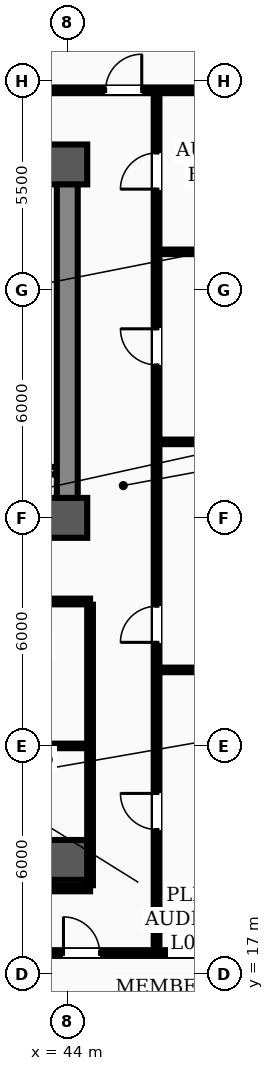
"""IFC4 building model, lengths in metres.
Left out: names, types, materials, properties, quantities, classifications, styles, units other than length and angle.
Written with IfcOpenShell. Run it as: python <this file> out.ifc"""

import sys

from ifc_helpers import new_model, si_unit, direction, frame, frame_2d, origin, origin_2d, place, context, subcontext, project, spatial, rectangle, hollow_rectangle, extrude, element, fill, save


model = new_model("IFC4")
c1 = context("Model", 3, precision=1e-05, world=origin(), true_north=direction((0.0, 1.0)))
c2 = subcontext(c1, "Body", "Model", "MODEL_VIEW")
j1 = project(units=[si_unit("LENGTHUNIT", "METRE"), si_unit("PLANEANGLEUNIT", "RADIAN")], contexts=[c1])
p1 = place(None, origin())
s1 = spatial("IfcSite", under=j1, at=p1, CompositionType="ELEMENT")
p2 = place(p1, origin())
s2 = spatial("IfcBuilding", under=s1, at=p2, CompositionType="ELEMENT")
p3 = place(p2, frame((0.0, 0.0, 22.0)))
s3 = spatial("IfcBuildingStorey", under=s2, at=p3, CompositionType="ELEMENT", Elevation=22.0)
for number, where, z_axis, x_axis in (
    (1, (44.0, 29.0, 0.0), (0.0, 0.0, 1.0), (1.0, 0.0, 0.0)),
    (2, (44.0, 38.3, 0.0), (0.0, 0.0, 1.0), (1.0, 0.0, 0.0)),
    (3, (44.0, 20.0, 0.0), (0.0, 0.0, 1.0), (1.0, 0.0, 0.0)),
):
    element("IfcColumn", number, at=place(p3, frame(where, z_axis=z_axis, x_axis=x_axis)), inside=s3, PredefinedType="COLUMN", context=c2, shape_type="SweptSolid", body=[
        extrude(hollow_rectangle(XDim=1.05, YDim=1.05, WallThickness=0.038, InnerFilletRadius=0.019, OuterFilletRadius=0.057, at=origin_2d()), origin(), (0.0, 0.0, 1.0), 4.5),
    ])
p4 = place(p3, frame((13.5, 29.0, 0.0), z_axis=(0.0, 0.0, 1.0), x_axis=(1.0, 0.0, 0.0)))
e4 = element("IfcWall", 4, at=p4, inside=s3, PredefinedType="SHEAR", context=c2, shape_type="SweptSolid", body=[
    extrude(rectangle(XDim=30.5, YDim=0.55, at=frame_2d((15.25, 0.0))), origin(), (0.0, 0.0, 1.0), 4.32),
])
p5 = place(p4, frame((1.75, 0.0, 0.0)))
e5 = element("IfcOpeningElement", 5, at=p5, cuts=e4, PredefinedType="OPENING", context=c2, shape_type="SweptSolid", body=[
    extrude(rectangle(XDim=1.1, YDim=2.08, at=frame_2d((0.55, 1.04))), frame((0.0, 0.285, 0.0), z_axis=(0.0, -1.0, 0.0), x_axis=(1.0, 0.0, 0.0)), (0.0, 0.0, 1.0), 0.57),
])
p6 = place(p4, frame((26.7, 0.0, 0.0)))
e6 = element("IfcOpeningElement", 6, at=p6, cuts=e4, PredefinedType="OPENING", context=c2, shape_type="SweptSolid", body=[
    extrude(rectangle(XDim=1.1, YDim=2.08, at=frame_2d((0.55, 1.04))), frame((0.0, 0.285, 0.0), z_axis=(0.0, -1.0, 0.0), x_axis=(1.0, 0.0, 0.0)), (0.0, 0.0, 1.0), 0.57),
])
p7 = place(p4, frame((6.8, 0.0, 0.0)))
e7 = element("IfcOpeningElement", 7, at=p7, cuts=e4, PredefinedType="OPENING", context=c2, shape_type="SweptSolid", body=[
    extrude(rectangle(XDim=1.1, YDim=2.08, at=frame_2d((0.55, 1.04))), frame((0.0, 0.285, 0.0), z_axis=(0.0, -1.0, 0.0), x_axis=(1.0, 0.0, 0.0)), (0.0, 0.0, 1.0), 0.57),
])
p8 = place(p4, frame((13.2, 0.0, 0.0)))
e8 = element("IfcOpeningElement", 8, at=p8, cuts=e4, PredefinedType="OPENING", context=c2, shape_type="SweptSolid", body=[
    extrude(rectangle(XDim=1.6, YDim=2.08, at=frame_2d((0.8, 1.04))), frame((0.0, 0.285, 0.0), z_axis=(0.0, -1.0, 0.0), x_axis=(1.0, 0.0, 0.0)), (0.0, 0.0, 1.0), 0.57),
])
p9 = place(p4, frame((19.5, 0.0, 0.0)))
e9 = element("IfcOpeningElement", 9, at=p9, cuts=e4, PredefinedType="OPENING", context=c2, shape_type="SweptSolid", body=[
    extrude(rectangle(XDim=0.9, YDim=2.08, at=frame_2d((0.45, 1.04))), frame((0.0, 0.285, 0.0), z_axis=(0.0, -1.0, 0.0), x_axis=(1.0, 0.0, 0.0)), (0.0, 0.0, 1.0), 0.57),
])
p10 = place(p4, frame((21.55, 0.0, 0.0)))
e10 = element("IfcOpeningElement", 10, at=p10, cuts=e4, PredefinedType="OPENING", context=c2, shape_type="SweptSolid", body=[
    extrude(rectangle(XDim=0.9, YDim=2.08, at=frame_2d((0.45, 1.04))), frame((0.0, 0.285, 0.0), z_axis=(0.0, -1.0, 0.0), x_axis=(1.0, 0.0, 0.0)), (0.0, 0.0, 1.0), 0.57),
])
p11 = place(p3, frame((13.5, 38.3, 0.0), z_axis=(0.0, 0.0, 1.0), x_axis=(1.0, 0.0, 0.0)))
e11 = element("IfcWall", 11, at=p11, inside=s3, PredefinedType="SHEAR", context=c2, shape_type="SweptSolid", body=[
    extrude(rectangle(XDim=30.5, YDim=0.55, at=frame_2d((15.25, 0.0))), origin(), (0.0, 0.0, 1.0), 4.32),
])
p12 = place(p3, frame((44.0, 29.35, 0.0), z_axis=(0.0, 0.0, 1.0), x_axis=(0.0, 1.0, 0.0)))
e12 = element("IfcWall", 12, at=p12, inside=s3, PredefinedType="SHEAR", context=c2, shape_type="SweptSolid", body=[
    extrude(rectangle(XDim=8.6, YDim=0.55, at=frame_2d((4.3, 0.0))), origin(), (0.0, 0.0, 1.0), 4.32),
])
p13 = place(p3, frame((42.4, 30.24, 0.0), z_axis=(0.0, 0.0, 1.0), x_axis=(1.0, 0.0, 0.0)))
e13 = element("IfcWall", 13, at=p13, inside=s3, PredefinedType="STANDARD", context=c2, shape_type="SweptSolid", body=[
    extrude(rectangle(XDim=1.315, YDim=0.2, at=frame_2d((0.658, 0.0))), origin(), (0.0, 0.0, 1.0), 3.7),
])
p14 = place(p3, frame((12.9, 26.8, 0.0), z_axis=(0.0, 0.0, 1.0), x_axis=(1.0, 0.0, 0.0)))
e14 = element("IfcWall", 14, at=p14, inside=s3, PredefinedType="PARTITIONING", context=c2, shape_type="SweptSolid", body=[
    extrude(rectangle(XDim=31.7, YDim=0.15, at=frame_2d((15.85, 0.0))), origin(), (0.0, 0.0, 1.0), 3.7),
])
p15 = place(p14, frame((13.6, 0.0, 0.0)))
e15 = element("IfcOpeningElement", 15, at=p15, cuts=e14, PredefinedType="OPENING", context=c2, shape_type="SweptSolid", body=[
    extrude(rectangle(XDim=1.6, YDim=2.08, at=frame_2d((0.8, 1.04))), frame((0.0, 0.085, 0.0), z_axis=(0.0, -1.0, 0.0), x_axis=(1.0, 0.0, 0.0)), (0.0, 0.0, 1.0), 0.17),
])
p16 = place(p14, frame((1.775, 0.0, 0.0)))
e16 = element("IfcOpeningElement", 16, at=p16, cuts=e14, PredefinedType="OPENING", context=c2, shape_type="SweptSolid", body=[
    extrude(rectangle(XDim=0.95, YDim=2.08, at=frame_2d((0.475, 1.04))), frame((0.0, 0.085, 0.0), z_axis=(0.0, -1.0, 0.0), x_axis=(1.0, 0.0, 0.0)), (0.0, 0.0, 1.0), 0.17),
])
p17 = place(p14, frame((6.225, 0.0, 0.0)))
e17 = element("IfcOpeningElement", 17, at=p17, cuts=e14, PredefinedType="OPENING", context=c2, shape_type="SweptSolid", body=[
    extrude(rectangle(XDim=0.95, YDim=2.08, at=frame_2d((0.475, 1.04))), frame((0.0, 0.085, 0.0), z_axis=(0.0, -1.0, 0.0), x_axis=(1.0, 0.0, 0.0)), (0.0, 0.0, 1.0), 0.17),
])
p18 = place(p14, frame((10.625, 0.0, 0.0)))
e18 = element("IfcOpeningElement", 18, at=p18, cuts=e14, PredefinedType="OPENING", context=c2, shape_type="SweptSolid", body=[
    extrude(rectangle(XDim=0.95, YDim=2.08, at=frame_2d((0.475, 1.04))), frame((0.0, 0.085, 0.0), z_axis=(0.0, -1.0, 0.0), x_axis=(1.0, 0.0, 0.0)), (0.0, 0.0, 1.0), 0.17),
])
p19 = place(p14, frame((16.075, 0.0, 0.0)))
e19 = element("IfcOpeningElement", 19, at=p19, cuts=e14, PredefinedType="OPENING", context=c2, shape_type="SweptSolid", body=[
    extrude(rectangle(XDim=0.95, YDim=2.08, at=frame_2d((0.475, 1.04))), frame((0.0, 0.085, 0.0), z_axis=(0.0, -1.0, 0.0), x_axis=(1.0, 0.0, 0.0)), (0.0, 0.0, 1.0), 0.17),
])
p20 = place(p14, frame((21.925, 0.0, 0.0)))
e20 = element("IfcOpeningElement", 20, at=p20, cuts=e14, PredefinedType="OPENING", context=c2, shape_type="SweptSolid", body=[
    extrude(rectangle(XDim=0.95, YDim=2.08, at=frame_2d((0.475, 1.04))), frame((0.0, 0.085, 0.0), z_axis=(0.0, -1.0, 0.0), x_axis=(1.0, 0.0, 0.0)), (0.0, 0.0, 1.0), 0.17),
])
p21 = place(p14, frame((28.625, 0.0, 0.0)))
e21 = element("IfcOpeningElement", 21, at=p21, cuts=e14, PredefinedType="OPENING", context=c2, shape_type="SweptSolid", body=[
    extrude(rectangle(XDim=0.95, YDim=2.08, at=frame_2d((0.475, 1.04))), frame((0.0, 0.085, 0.0), z_axis=(0.0, -1.0, 0.0), x_axis=(1.0, 0.0, 0.0)), (0.0, 0.0, 1.0), 0.17),
])
p22 = place(p3, frame((4.66, 17.55, 0.0), z_axis=(0.0, 0.0, 1.0), x_axis=(1.0, 0.0, 0.0)))
e22 = element("IfcWall", 22, at=p22, inside=s3, PredefinedType="PARTITIONING", context=c2, shape_type="SweptSolid", body=[
    extrude(rectangle(XDim=44.68, YDim=0.15, at=frame_2d((22.34, 0.0))), origin(), (0.0, 0.0, 1.0), 3.7),
])
p23 = place(p22, frame((6.74, 0.0, 0.0)))
e23 = element("IfcOpeningElement", 23, at=p23, cuts=e22, PredefinedType="OPENING", context=c2, shape_type="SweptSolid", body=[
    extrude(rectangle(XDim=0.95, YDim=2.08, at=frame_2d((0.475, 1.04))), frame((0.0, 0.085, 0.0), z_axis=(0.0, -1.0, 0.0), x_axis=(1.0, 0.0, 0.0)), (0.0, 0.0, 1.0), 0.17),
])
p24 = place(p22, frame((13.865, 0.0, 0.0)))
e24 = element("IfcOpeningElement", 24, at=p24, cuts=e22, PredefinedType="OPENING", context=c2, shape_type="SweptSolid", body=[
    extrude(rectangle(XDim=0.95, YDim=2.08, at=frame_2d((0.475, 1.04))), frame((0.0, 0.085, 0.0), z_axis=(0.0, -1.0, 0.0), x_axis=(1.0, 0.0, 0.0)), (0.0, 0.0, 1.0), 0.17),
])
p25 = place(p22, frame((28.765, 0.0, 0.0)))
e25 = element("IfcOpeningElement", 25, at=p25, cuts=e22, PredefinedType="OPENING", context=c2, shape_type="SweptSolid", body=[
    extrude(rectangle(XDim=0.95, YDim=2.08, at=frame_2d((0.475, 1.04))), frame((0.0, 0.085, 0.0), z_axis=(0.0, -1.0, 0.0), x_axis=(1.0, 0.0, 0.0)), (0.0, 0.0, 1.0), 0.17),
])
p26 = place(p22, frame((34.465, 0.0, 0.0)))
e26 = element("IfcOpeningElement", 26, at=p26, cuts=e22, PredefinedType="OPENING", context=c2, shape_type="SweptSolid", body=[
    extrude(rectangle(XDim=0.95, YDim=2.08, at=frame_2d((0.475, 1.04))), frame((0.0, 0.085, 0.0), z_axis=(0.0, -1.0, 0.0), x_axis=(1.0, 0.0, 0.0)), (0.0, 0.0, 1.0), 0.17),
])
p27 = place(p22, frame((39.24, 0.0, 0.0)))
e27 = element("IfcOpeningElement", 27, at=p27, cuts=e22, PredefinedType="OPENING", context=c2, shape_type="SweptSolid", body=[
    extrude(rectangle(XDim=0.95, YDim=2.08, at=frame_2d((0.475, 1.04))), frame((0.0, 0.085, 0.0), z_axis=(0.0, -1.0, 0.0), x_axis=(1.0, 0.0, 0.0)), (0.0, 0.0, 1.0), 0.17),
])
p28 = place(p3, frame((28.4, 19.25, 0.0), z_axis=(0.0, 0.0, 1.0), x_axis=(1.0, 0.0, 0.0)))
e28 = element("IfcWall", 28, at=p28, inside=s3, PredefinedType="PARTITIONING", context=c2, shape_type="SweptSolid", body=[
    extrude(rectangle(XDim=16.2, YDim=0.15, at=frame_2d((8.1, 0.0))), origin(), (0.0, 0.0, 1.0), 3.7),
])
p29 = place(p28, frame((0.575, 0.0, 0.0)))
e29 = element("IfcOpeningElement", 29, at=p29, cuts=e28, PredefinedType="OPENING", context=c2, shape_type="SweptSolid", body=[
    extrude(rectangle(XDim=0.95, YDim=2.08, at=frame_2d((0.475, 1.04))), frame((0.0, 0.085, 0.0), z_axis=(0.0, -1.0, 0.0), x_axis=(1.0, 0.0, 0.0)), (0.0, 0.0, 1.0), 0.17),
])
p30 = place(p28, frame((6.425, 0.0, 0.0)))
e30 = element("IfcOpeningElement", 30, at=p30, cuts=e28, PredefinedType="OPENING", context=c2, shape_type="SweptSolid", body=[
    extrude(rectangle(XDim=0.95, YDim=2.08, at=frame_2d((0.475, 1.04))), frame((0.0, 0.085, 0.0), z_axis=(0.0, -1.0, 0.0), x_axis=(1.0, 0.0, 0.0)), (0.0, 0.0, 1.0), 0.17),
])
p31 = place(p28, frame((13.125, 0.0, 0.0)))
e31 = element("IfcOpeningElement", 31, at=p31, cuts=e28, PredefinedType="OPENING", context=c2, shape_type="SweptSolid", body=[
    extrude(rectangle(XDim=0.95, YDim=2.08, at=frame_2d((0.475, 1.04))), frame((0.0, 0.085, 0.0), z_axis=(0.0, -1.0, 0.0), x_axis=(1.0, 0.0, 0.0)), (0.0, 0.0, 1.0), 0.17),
])
p32 = place(p3, frame((39.4, 23.0, 0.0), z_axis=(0.0, 0.0, 1.0), x_axis=(1.0, 0.0, 0.0)))
e32 = element("IfcWall", 32, at=p32, inside=s3, PredefinedType="PARTITIONING", context=c2, shape_type="SweptSolid", body=[
    extrude(rectangle(XDim=5.2, YDim=0.12, at=frame_2d((2.6, 0.0))), origin(), (0.0, 0.0, 1.0), 3.7),
])
for number, where, z_axis, x_axis in (
    (33, (46.35, 25.0, 0.0), (0.0, 0.0, 1.0), (1.0, 0.0, 0.0)),
    (34, (46.35, 31.0, 0.0), (0.0, 0.0, 1.0), (1.0, 0.0, 0.0)),
    (35, (46.35, 36.0, 0.0), (0.0, 0.0, 1.0), (1.0, 0.0, 0.0)),
):
    element("IfcWall", number, at=place(p3, frame(where, z_axis=z_axis, x_axis=x_axis)), inside=s3, PredefinedType="PARTITIONING", context=c2, shape_type="SweptSolid", body=[
        extrude(rectangle(XDim=5.34, YDim=0.12, at=frame_2d((2.67, 0.0))), origin(), (0.0, 0.0, 1.0), 3.812),
    ])
p33 = place(p3, frame((2.31, 40.25, 0.0), z_axis=(0.0, 0.0, 1.0), x_axis=(1.0, 0.0, 0.0)))
e36 = element("IfcWall", 36, at=p33, inside=s3, PredefinedType="PARTITIONING", context=c2, shape_type="SweptSolid", body=[
    extrude(rectangle(XDim=49.38, YDim=0.15, at=frame_2d((24.69, 0.0))), origin(), (0.0, 0.0, 1.0), 3.7),
])
p34 = place(p33, frame((9.23, 0.0, 0.0)))
e37 = element("IfcOpeningElement", 37, at=p34, cuts=e36, PredefinedType="OPENING", context=c2, shape_type="SweptSolid", body=[
    extrude(rectangle(XDim=0.95, YDim=2.08, at=frame_2d((0.475, 1.04))), frame((0.0, 0.085, 0.0), z_axis=(0.0, -1.0, 0.0), x_axis=(1.0, 0.0, 0.0)), (0.0, 0.0, 1.0), 0.17),
])
p35 = place(p33, frame((18.715, 0.0, 0.0)))
e38 = element("IfcOpeningElement", 38, at=p35, cuts=e36, PredefinedType="OPENING", context=c2, shape_type="SweptSolid", body=[
    extrude(rectangle(XDim=0.95, YDim=2.08, at=frame_2d((0.475, 1.04))), frame((0.0, 0.085, 0.0), z_axis=(0.0, -1.0, 0.0), x_axis=(1.0, 0.0, 0.0)), (0.0, 0.0, 1.0), 0.17),
])
p36 = place(p33, frame((26.715, 0.0, 0.0)))
e39 = element("IfcOpeningElement", 39, at=p36, cuts=e36, PredefinedType="OPENING", context=c2, shape_type="SweptSolid", body=[
    extrude(rectangle(XDim=0.95, YDim=2.08, at=frame_2d((0.475, 1.04))), frame((0.0, 0.085, 0.0), z_axis=(0.0, -1.0, 0.0), x_axis=(1.0, 0.0, 0.0)), (0.0, 0.0, 1.0), 0.17),
])
p37 = place(p33, frame((31.765, 0.0, 0.0)))
e40 = element("IfcOpeningElement", 40, at=p37, cuts=e36, PredefinedType="OPENING", context=c2, shape_type="SweptSolid", body=[
    extrude(rectangle(XDim=0.95, YDim=2.08, at=frame_2d((0.475, 1.04))), frame((0.0, 0.085, 0.0), z_axis=(0.0, -1.0, 0.0), x_axis=(1.0, 0.0, 0.0)), (0.0, 0.0, 1.0), 0.17),
])
p38 = place(p33, frame((42.7, 0.0, 0.0)))
e41 = element("IfcOpeningElement", 41, at=p38, cuts=e36, PredefinedType="OPENING", context=c2, shape_type="SweptSolid", body=[
    extrude(rectangle(XDim=0.95, YDim=2.08, at=frame_2d((0.475, 1.04))), frame((0.0, 0.085, 0.0), z_axis=(0.0, -1.0, 0.0), x_axis=(1.0, 0.0, 0.0)), (0.0, 0.0, 1.0), 0.17),
])
p39 = place(p3, frame((46.35, 17.635, 0.0), z_axis=(0.0, 0.0, 1.0), x_axis=(0.0, 1.0, 0.0)))
e42 = element("IfcWall", 42, at=p39, inside=s3, PredefinedType="PARTITIONING", context=c2, shape_type="SweptSolid", body=[
    extrude(rectangle(XDim=22.53, YDim=0.15, at=frame_2d((11.265, 0.0))), origin(), (0.0, 0.0, 1.0), 3.6),
])
p40 = place(p39, frame((3.165, 0.0, 0.0)))
e43 = element("IfcOpeningElement", 43, at=p40, cuts=e42, PredefinedType="OPENING", context=c2, shape_type="SweptSolid", body=[
    extrude(rectangle(XDim=0.95, YDim=2.08, at=frame_2d((0.475, 1.04))), frame((0.0, 0.085, 0.0), z_axis=(0.0, -1.0, 0.0), x_axis=(1.0, 0.0, 0.0)), (0.0, 0.0, 1.0), 0.17),
])
p41 = place(p39, frame((8.09, 0.0, 0.0)))
e44 = element("IfcOpeningElement", 44, at=p41, cuts=e42, PredefinedType="OPENING", context=c2, shape_type="SweptSolid", body=[
    extrude(rectangle(XDim=0.95, YDim=2.08, at=frame_2d((0.475, 1.04))), frame((0.0, 0.085, 0.0), z_axis=(0.0, -1.0, 0.0), x_axis=(1.0, 0.0, 0.0)), (0.0, 0.0, 1.0), 0.17),
])
p42 = place(p39, frame((15.39, 0.0, 0.0)))
e45 = element("IfcOpeningElement", 45, at=p42, cuts=e42, PredefinedType="OPENING", context=c2, shape_type="SweptSolid", body=[
    extrude(rectangle(XDim=0.95, YDim=2.08, at=frame_2d((0.475, 1.04))), frame((0.0, 0.085, 0.0), z_axis=(0.0, -1.0, 0.0), x_axis=(1.0, 0.0, 0.0)), (0.0, 0.0, 1.0), 0.17),
])
p43 = place(p39, frame((20.015, 0.0, 0.0)))
e46 = element("IfcOpeningElement", 46, at=p43, cuts=e42, PredefinedType="OPENING", context=c2, shape_type="SweptSolid", body=[
    extrude(rectangle(XDim=0.95, YDim=2.08, at=frame_2d((0.475, 1.04))), frame((0.0, 0.085, 0.0), z_axis=(0.0, -1.0, 0.0), x_axis=(1.0, 0.0, 0.0)), (0.0, 0.0, 1.0), 0.17),
])
p44 = place(p3, frame((44.6, 19.335, 0.0), z_axis=(0.0, 0.0, 1.0), x_axis=(0.0, 1.0, 0.0)))
e47 = element("IfcWall", 47, at=p44, inside=s3, PredefinedType="PARTITIONING", context=c2, shape_type="SweptSolid", body=[
    extrude(rectangle(XDim=7.38, YDim=0.15, at=frame_2d((3.69, 0.0))), origin(), (0.0, 0.0, 1.0), 3.6),
])
p45 = place(p27, origin())
e48 = element("IfcDoor", 48, at=p45, inside=s3, OperationType="SINGLE_SWING_LEFT", PredefinedType="DOOR", context=c2, shape_type="SweptSolid", body=[
    extrude(rectangle(XDim=0.95, YDim=2.08, at=frame_2d((0.475, 1.04))), frame((0.0, 0.025, 0.0), z_axis=(0.0, -1.0, 0.0), x_axis=(1.0, 0.0, 0.0)), (0.0, 0.0, 1.0), 0.05),
])
fill(e27, e48)
p46 = place(p40, origin())
e49 = element("IfcDoor", 49, at=p46, inside=s3, OperationType="SINGLE_SWING_RIGHT", PredefinedType="DOOR", context=c2, shape_type="SweptSolid", body=[
    extrude(rectangle(XDim=0.95, YDim=2.08, at=frame_2d((0.475, 1.04))), frame((0.0, 0.025, 0.0), z_axis=(0.0, -1.0, 0.0), x_axis=(1.0, 0.0, 0.0)), (0.0, 0.0, 1.0), 0.05),
])
fill(e43, e49)
p47 = place(p41, origin())
e50 = element("IfcDoor", 50, at=p47, inside=s3, OperationType="SINGLE_SWING_LEFT", PredefinedType="DOOR", context=c2, shape_type="SweptSolid", body=[
    extrude(rectangle(XDim=0.95, YDim=2.08, at=frame_2d((0.475, 1.04))), frame((0.0, 0.025, 0.0), z_axis=(0.0, -1.0, 0.0), x_axis=(1.0, 0.0, 0.0)), (0.0, 0.0, 1.0), 0.05),
])
fill(e44, e50)
p48 = place(p42, origin())
e51 = element("IfcDoor", 51, at=p48, inside=s3, OperationType="SINGLE_SWING_RIGHT", PredefinedType="DOOR", context=c2, shape_type="SweptSolid", body=[
    extrude(rectangle(XDim=0.95, YDim=2.08, at=frame_2d((0.475, 1.04))), frame((0.0, 0.025, 0.0), z_axis=(0.0, -1.0, 0.0), x_axis=(1.0, 0.0, 0.0)), (0.0, 0.0, 1.0), 0.05),
])
fill(e45, e51)
p49 = place(p43, origin())
e52 = element("IfcDoor", 52, at=p49, inside=s3, OperationType="SINGLE_SWING_LEFT", PredefinedType="DOOR", context=c2, shape_type="SweptSolid", body=[
    extrude(rectangle(XDim=0.95, YDim=2.08, at=frame_2d((0.475, 1.04))), frame((0.0, 0.025, 0.0), z_axis=(0.0, -1.0, 0.0), x_axis=(1.0, 0.0, 0.0)), (0.0, 0.0, 1.0), 0.05),
])
fill(e46, e52)
p50 = place(p38, origin())
e53 = element("IfcDoor", 53, at=p50, inside=s3, OperationType="SINGLE_SWING_RIGHT", PredefinedType="DOOR", context=c2, shape_type="SweptSolid", body=[
    extrude(rectangle(XDim=0.95, YDim=2.08, at=frame_2d((0.475, 1.04))), frame((0.0, 0.025, 0.0), z_axis=(0.0, -1.0, 0.0), x_axis=(1.0, 0.0, 0.0)), (0.0, 0.0, 1.0), 0.05),
])
fill(e41, e53)
save(model, sys.argv[1])
